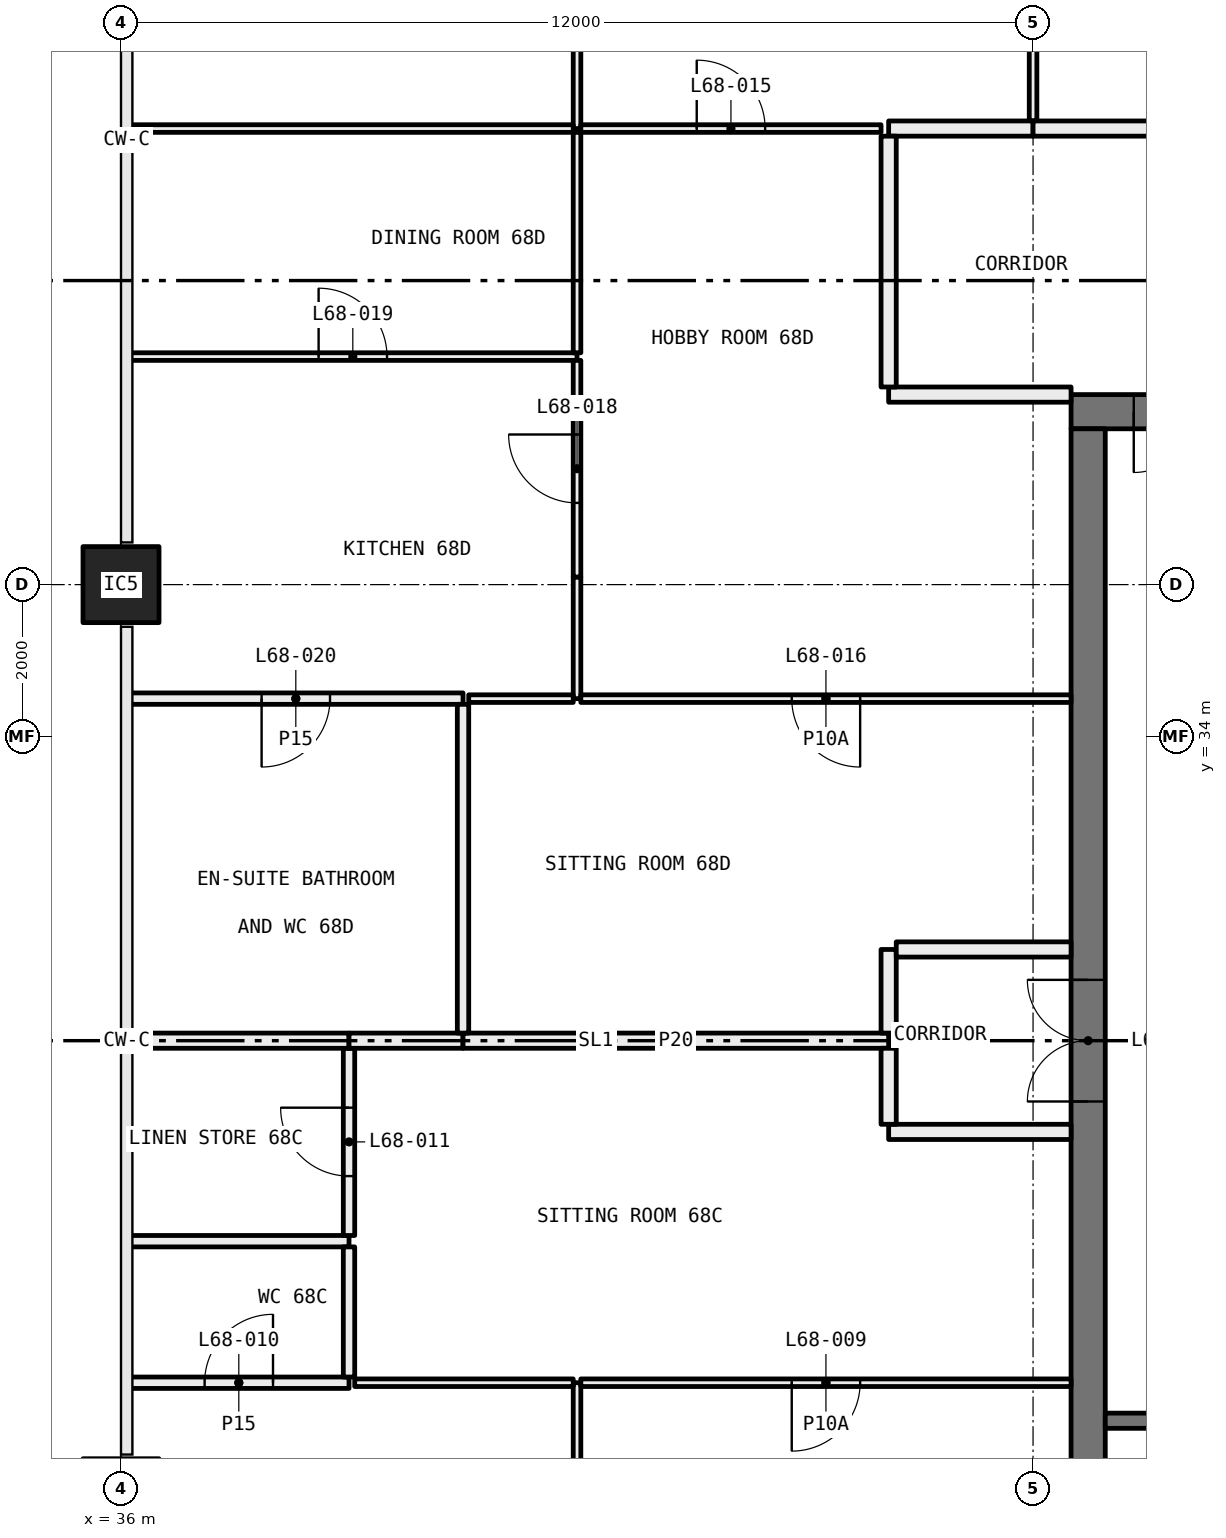
"""IFC4 building model, lengths in metres.
Left out: names, types, materials, properties, quantities, classifications, styles, units other than length and angle.
Written with IfcOpenShell. Run it as: python <this file> out.ifc"""

import sys

from ifc_helpers import new_model, si_unit, direction, frame, frame_2d, origin, origin_2d, place, context, subcontext, project, spatial, rectangle, hollow_rectangle, extrude, element, fill, save


model = new_model("IFC4")
c1 = context("Model", 3, precision=1e-05, world=origin(), true_north=direction((0.0, 1.0)))
c2 = subcontext(c1, "Body", "Model", "MODEL_VIEW")
j1 = project(units=[si_unit("LENGTHUNIT", "METRE"), si_unit("PLANEANGLEUNIT", "RADIAN")], contexts=[c1])
p1 = place(None, origin())
s1 = spatial("IfcSite", under=j1, at=p1, CompositionType="ELEMENT")
p2 = place(p1, origin())
s2 = spatial("IfcBuilding", under=s1, at=p2, CompositionType="ELEMENT")
p3 = place(p2, frame((0.0, 0.0, 252.45)))
s3 = spatial("IfcBuildingStorey", under=s2, at=p3, CompositionType="ELEMENT", Elevation=252.45)
p4 = place(p3, frame((36.0, 36.0, 0.0), z_axis=(0.0, 0.0, 1.0), x_axis=(1.0, 0.0, 0.0)))
e1 = element("IfcColumn", 1, at=p4, inside=s3, PredefinedType="COLUMN", context=c2, shape_type="SweptSolid", body=[
    extrude(hollow_rectangle(XDim=1.0, YDim=1.0, WallThickness=0.04, at=origin_2d()), origin(), (0.0, 0.0, 1.0), 3.05),
])
p5 = place(p3, frame((42.0, 24.1, 0.0), z_axis=(0.0, 0.0, 1.0), x_axis=(0.0, 1.0, 0.0)))
e2 = element("IfcWall", 2, at=p5, inside=s3, PredefinedType="PARTITIONING", context=c2, shape_type="SweptSolid", body=[
    extrude(rectangle(XDim=1.4, YDim=0.1, at=frame_2d((0.7, 0.0))), origin(), (0.0, 0.0, 1.0), 3.05),
])
p6 = place(p3, frame((39.0, 25.5, 0.0), z_axis=(0.0, 0.0, 1.0), x_axis=(-1.0, 0.0, 0.0)))
e3 = element("IfcWall", 3, at=p6, inside=s3, PredefinedType="PARTITIONING", context=c2, shape_type="SweptSolid", body=[
    extrude(rectangle(XDim=2.9, YDim=0.15, at=frame_2d((1.45, 0.0))), origin(), (0.0, 0.0, 1.0), 3.05),
])
p7 = place(p6, frame((1.0, 0.0, 0.0)))
e4 = element("IfcOpeningElement", 4, at=p7, cuts=e3, PredefinedType="OPENING", context=c2, shape_type="SweptSolid", body=[
    extrude(rectangle(XDim=0.9, YDim=2.1, at=frame_2d((0.45, 1.05))), frame((0.0, 0.085, 0.0), z_axis=(0.0, -1.0, 0.0), x_axis=(1.0, 0.0, 0.0)), (0.0, 0.0, 1.0), 0.17),
])
p8 = place(p3, frame((41.95, 25.5, 0.0), z_axis=(0.0, 0.0, 1.0), x_axis=(-1.0, 0.0, 0.0)))
e5 = element("IfcWall", 5, at=p8, inside=s3, PredefinedType="PARTITIONING", context=c2, shape_type="SweptSolid", body=[
    extrude(rectangle(XDim=2.875, YDim=0.1, at=frame_2d((1.438, 0.0))), origin(), (0.0, 0.0, 1.0), 3.05),
])
p9 = place(p3, frame((48.5, 25.5, 0.0), z_axis=(0.0, 0.0, 1.0), x_axis=(-1.0, 0.0, 0.0)))
e6 = element("IfcWall", 6, at=p9, inside=s3, PredefinedType="PARTITIONING", context=c2, shape_type="SweptSolid", body=[
    extrude(rectangle(XDim=6.45, YDim=0.1, at=frame_2d((3.225, 0.0))), origin(), (0.0, 0.0, 1.0), 3.05),
])
p10 = place(p9, frame((2.775, 0.0, 0.0)))
e7 = element("IfcOpeningElement", 7, at=p10, cuts=e6, PredefinedType="OPENING", context=c2, shape_type="SweptSolid", body=[
    extrude(rectangle(XDim=0.9, YDim=2.1, at=frame_2d((0.45, 1.05))), frame((0.0, 0.06, 0.0), z_axis=(0.0, -1.0, 0.0), x_axis=(1.0, 0.0, 0.0)), (0.0, 0.0, 1.0), 0.12),
])
p11 = place(p3, frame((39.0, 27.362, 0.0), z_axis=(0.0, 0.0, 1.0), x_axis=(-1.0, 0.0, 0.0)))
e8 = element("IfcWall", 8, at=p11, inside=s3, PredefinedType="PARTITIONING", context=c2, shape_type="SweptSolid", body=[
    extrude(rectangle(XDim=2.9, YDim=0.15, at=frame_2d((1.45, 0.0))), origin(), (0.0, 0.0, 1.0), 3.05),
])
p12 = place(p3, frame((39.0, 25.575, 0.0), z_axis=(0.0, 0.0, 1.0), x_axis=(0.0, 1.0, 0.0)))
e9 = element("IfcWall", 9, at=p12, inside=s3, PredefinedType="PARTITIONING", context=c2, shape_type="SweptSolid", body=[
    extrude(rectangle(XDim=1.712, YDim=0.15, at=frame_2d((0.856, 0.0))), origin(), (0.0, 0.0, 1.0), 3.05),
])
p13 = place(p3, frame((39.0, 27.437, 0.0), z_axis=(0.0, 0.0, 1.0), x_axis=(0.0, 1.0, 0.0)))
e10 = element("IfcWall", 10, at=p13, inside=s3, PredefinedType="PARTITIONING", context=c2, shape_type="SweptSolid", body=[
    extrude(rectangle(XDim=2.463, YDim=0.15, at=frame_2d((1.231, 0.0))), origin(), (0.0, 0.0, 1.0), 3.05),
])
p14 = place(p13, frame((0.781, 0.0, 0.0)))
e11 = element("IfcOpeningElement", 11, at=p14, cuts=e10, PredefinedType="OPENING", context=c2, shape_type="SweptSolid", body=[
    extrude(rectangle(XDim=0.9, YDim=2.1, at=frame_2d((0.45, 1.05))), frame((0.0, 0.085, 0.0), z_axis=(0.0, -1.0, 0.0), x_axis=(1.0, 0.0, 0.0)), (0.0, 0.0, 1.0), 0.17),
])
p15 = place(p3, frame((39.0, 30.0, 0.0), z_axis=(0.0, 0.0, 1.0), x_axis=(-1.0, 0.0, 0.0)))
e12 = element("IfcWall", 12, at=p15, inside=s3, PredefinedType="PARTITIONING", context=c2, shape_type="SweptSolid", body=[
    extrude(rectangle(XDim=2.9, YDim=0.2, at=frame_2d((1.45, 0.0))), origin(), (0.0, 0.0, 1.0), 3.05),
])
p16 = place(p3, frame((40.5, 30.0, 0.0), z_axis=(0.0, 0.0, 1.0), x_axis=(-1.0, 0.0, 0.0)))
e13 = element("IfcWall", 13, at=p16, inside=s3, PredefinedType="PARTITIONING", context=c2, shape_type="SweptSolid", body=[
    extrude(rectangle(XDim=1.5, YDim=0.2, at=frame_2d((0.75, 0.0))), origin(), (0.0, 0.0, 1.0), 3.05),
])
p17 = place(p3, frame((46.1, 30.0, 0.0), z_axis=(0.0, 0.0, 1.0), x_axis=(-1.0, 0.0, 0.0)))
e14 = element("IfcWall", 14, at=p17, inside=s3, PredefinedType="PARTITIONING", context=c2, shape_type="SweptSolid", body=[
    extrude(rectangle(XDim=5.6, YDim=0.2, at=frame_2d((2.8, 0.0))), origin(), (0.0, 0.0, 1.0), 3.05),
])
p18 = place(p3, frame((48.5, 28.8, 0.0), z_axis=(0.0, 0.0, 1.0), x_axis=(-1.0, 0.0, 0.0)))
e15 = element("IfcWall", 15, at=p18, inside=s3, PredefinedType="PARTITIONING", context=c2, shape_type="SweptSolid", body=[
    extrude(rectangle(XDim=2.4, YDim=0.2, at=frame_2d((1.2, 0.0))), origin(), (0.0, 0.0, 1.0), 3.05),
])
p19 = place(p3, frame((46.1, 28.9, 0.0), z_axis=(0.0, 0.0, 1.0), x_axis=(0.0, 1.0, 0.0)))
e16 = element("IfcWall", 16, at=p19, inside=s3, PredefinedType="PARTITIONING", context=c2, shape_type="SweptSolid", body=[
    extrude(rectangle(XDim=1.0, YDim=0.2, at=frame_2d((0.5, 0.0))), origin(), (0.0, 0.0, 1.0), 3.05),
])
p20 = place(p3, frame((42.0, 42.0, 0.0), z_axis=(0.0, 0.0, 1.0), x_axis=(0.0, 1.0, 0.0)))
e17 = element("IfcWall", 17, at=p20, inside=s3, PredefinedType="PARTITIONING", context=c2, shape_type="SweptSolid", body=[
    extrude(rectangle(XDim=5.28, YDim=0.1, at=frame_2d((2.64, 0.0))), origin(), (0.0, 0.0, 1.0), 3.05),
])
p21 = place(p20, frame((2.19, 0.0, 0.0)))
e18 = element("IfcOpeningElement", 18, at=p21, cuts=e17, PredefinedType="OPENING", context=c2, shape_type="SweptSolid", body=[
    extrude(rectangle(XDim=0.9, YDim=2.1, at=frame_2d((0.45, 1.05))), frame((0.0, 0.06, 0.0), z_axis=(0.0, -1.0, 0.0), x_axis=(1.0, 0.0, 0.0)), (0.0, 0.0, 1.0), 0.12),
])
p22 = place(p3, frame((36.1, 42.0, 0.0), z_axis=(0.0, 0.0, 1.0), x_axis=(1.0, 0.0, 0.0)))
e19 = element("IfcWall", 19, at=p22, inside=s3, PredefinedType="PARTITIONING", context=c2, shape_type="SweptSolid", body=[
    extrude(rectangle(XDim=5.85, YDim=0.1, at=frame_2d((2.925, 0.0))), origin(), (0.0, 0.0, 1.0), 3.05),
])
p23 = place(p3, frame((48.0, 42.1, 0.0), z_axis=(0.0, 0.0, 1.0), x_axis=(0.0, 1.0, 0.0)))
e20 = element("IfcWall", 20, at=p23, inside=s3, PredefinedType="PARTITIONING", context=c2, shape_type="SweptSolid", body=[
    extrude(rectangle(XDim=5.18, YDim=0.1, at=frame_2d((2.59, 0.0))), origin(), (0.0, 0.0, 1.0), 3.05),
])
p24 = place(p23, frame((2.14, 0.0, 0.0)))
e21 = element("IfcOpeningElement", 21, at=p24, cuts=e20, PredefinedType="OPENING", context=c2, shape_type="SweptSolid", body=[
    extrude(rectangle(XDim=0.9, YDim=2.1, at=frame_2d((0.45, 1.05))), frame((0.0, 0.06, 0.0), z_axis=(0.0, -1.0, 0.0), x_axis=(1.0, 0.0, 0.0)), (0.0, 0.0, 1.0), 0.12),
])
p25 = place(p3, frame((42.05, 42.0, 0.0), z_axis=(0.0, 0.0, 1.0), x_axis=(1.0, 0.0, 0.0)))
e22 = element("IfcWall", 22, at=p25, inside=s3, PredefinedType="PARTITIONING", context=c2, shape_type="SweptSolid", body=[
    extrude(rectangle(XDim=3.95, YDim=0.1, at=frame_2d((1.975, 0.0))), origin(), (0.0, 0.0, 1.0), 3.05),
])
p26 = place(p25, frame((1.525, 0.0, 0.0)))
e23 = element("IfcOpeningElement", 23, at=p26, cuts=e22, PredefinedType="OPENING", context=c2, shape_type="SweptSolid", body=[
    extrude(rectangle(XDim=0.9, YDim=2.1, at=frame_2d((0.45, 1.05))), frame((0.0, 0.06, 0.0), z_axis=(0.0, -1.0, 0.0), x_axis=(1.0, 0.0, 0.0)), (0.0, 0.0, 1.0), 0.12),
])
p27 = place(p3, frame((46.1, 42.0, 0.0), z_axis=(0.0, 0.0, 1.0), x_axis=(1.0, 0.0, 0.0)))
e24 = element("IfcWall", 24, at=p27, inside=s3, PredefinedType="PARTITIONING", context=c2, shape_type="SweptSolid", body=[
    extrude(rectangle(XDim=1.9, YDim=0.2, at=frame_2d((0.95, 0.0))), origin(), (0.0, 0.0, 1.0), 3.05),
])
p28 = place(p3, frame((48.0, 42.0, 0.0), z_axis=(0.0, 0.0, 1.0), x_axis=(1.0, 0.0, 0.0)))
e25 = element("IfcWall", 25, at=p28, inside=s3, PredefinedType="PARTITIONING", context=c2, shape_type="SweptSolid", body=[
    extrude(rectangle(XDim=3.5, YDim=0.2, at=frame_2d((1.75, 0.0))), origin(), (0.0, 0.0, 1.0), 3.05),
])
p29 = place(p3, frame((42.0, 39.0, 0.0), z_axis=(0.0, 0.0, 1.0), x_axis=(-1.0, 0.0, 0.0)))
e26 = element("IfcWall", 26, at=p29, inside=s3, PredefinedType="PARTITIONING", context=c2, shape_type="SweptSolid", body=[
    extrude(rectangle(XDim=5.9, YDim=0.1, at=frame_2d((2.95, 0.0))), origin(), (0.0, 0.0, 1.0), 3.05),
])
p30 = place(p29, frame((2.5, 0.0, 0.0)))
e27 = element("IfcOpeningElement", 27, at=p30, cuts=e26, PredefinedType="OPENING", context=c2, shape_type="SweptSolid", body=[
    extrude(rectangle(XDim=0.9, YDim=2.1, at=frame_2d((0.45, 1.05))), frame((0.0, 0.06, 0.0), z_axis=(0.0, -1.0, 0.0), x_axis=(1.0, 0.0, 0.0)), (0.0, 0.0, 1.0), 0.12),
])
p31 = place(p3, frame((42.0, 34.5, 0.0), z_axis=(0.0, 0.0, 1.0), x_axis=(0.0, 1.0, 0.0)))
e28 = element("IfcWall", 28, at=p31, inside=s3, PredefinedType="PARTITIONING", context=c2, shape_type="SweptSolid", body=[
    extrude(rectangle(XDim=1.6, YDim=0.1, at=frame_2d((0.8, 0.0))), origin(), (0.0, 0.0, 1.0), 2.45),
])
p32 = place(p3, frame((42.0, 36.1, 0.0), z_axis=(0.0, 0.0, 1.0), x_axis=(0.0, 1.0, 0.0)))
e29 = element("IfcWall", 29, at=p32, inside=s3, PredefinedType="PARTITIONING", context=c2, shape_type="SweptSolid", body=[
    extrude(rectangle(XDim=2.85, YDim=0.1, at=frame_2d((1.425, 0.0))), origin(), (0.0, 0.0, 1.0), 3.05),
])
p33 = place(p32, frame((0.975, 0.0, 0.0)))
e30 = element("IfcOpeningElement", 30, at=p33, cuts=e29, PredefinedType="OPENING", context=c2, shape_type="SweptSolid", body=[
    extrude(rectangle(XDim=0.9, YDim=2.1, at=frame_2d((0.45, 1.05))), frame((0.0, 0.06, 0.0), z_axis=(0.0, -1.0, 0.0), x_axis=(1.0, 0.0, 0.0)), (0.0, 0.0, 1.0), 0.12),
])
p34 = place(p3, frame((36.1, 34.5, 0.0), z_axis=(0.0, 0.0, 1.0), x_axis=(1.0, 0.0, 0.0)))
e31 = element("IfcWall", 31, at=p34, inside=s3, PredefinedType="PARTITIONING", context=c2, shape_type="SweptSolid", body=[
    extrude(rectangle(XDim=4.4, YDim=0.15, at=frame_2d((2.2, 0.0))), origin(), (0.0, 0.0, 1.0), 3.05),
])
p35 = place(p34, frame((1.75, 0.0, 0.0)))
e32 = element("IfcOpeningElement", 32, at=p35, cuts=e31, PredefinedType="OPENING", context=c2, shape_type="SweptSolid", body=[
    extrude(rectangle(XDim=0.9, YDim=2.1, at=frame_2d((0.45, 1.05))), frame((0.0, 0.085, 0.0), z_axis=(0.0, -1.0, 0.0), x_axis=(1.0, 0.0, 0.0)), (0.0, 0.0, 1.0), 0.17),
])
p36 = place(p3, frame((40.575, 34.5, 0.0), z_axis=(0.0, 0.0, 1.0), x_axis=(1.0, 0.0, 0.0)))
e33 = element("IfcWall", 33, at=p36, inside=s3, PredefinedType="PARTITIONING", context=c2, shape_type="SweptSolid", body=[
    extrude(rectangle(XDim=1.375, YDim=0.1, at=frame_2d((0.688, 0.0))), origin(), (0.0, 0.0, 1.0), 3.05),
])
p37 = place(p3, frame((42.0, 39.05, 0.0), z_axis=(0.0, 0.0, 1.0), x_axis=(0.0, 1.0, 0.0)))
e34 = element("IfcWall", 34, at=p37, inside=s3, PredefinedType="PARTITIONING", context=c2, shape_type="SweptSolid", body=[
    extrude(rectangle(XDim=2.9, YDim=0.1, at=frame_2d((1.45, 0.0))), origin(), (0.0, 0.0, 1.0), 3.05),
])
p38 = place(p3, frame((42.05, 34.5, 0.0), z_axis=(0.0, 0.0, 1.0), x_axis=(1.0, 0.0, 0.0)))
e35 = element("IfcWall", 35, at=p38, inside=s3, PredefinedType="PARTITIONING", context=c2, shape_type="SweptSolid", body=[
    extrude(rectangle(XDim=6.45, YDim=0.1, at=frame_2d((3.225, 0.0))), origin(), (0.0, 0.0, 1.0), 3.05),
])
p39 = place(p38, frame((2.775, 0.0, 0.0)))
e36 = element("IfcOpeningElement", 36, at=p39, cuts=e35, PredefinedType="OPENING", context=c2, shape_type="SweptSolid", body=[
    extrude(rectangle(XDim=0.9, YDim=2.1, at=frame_2d((0.45, 1.05))), frame((0.0, 0.06, 0.0), z_axis=(0.0, -1.0, 0.0), x_axis=(1.0, 0.0, 0.0)), (0.0, 0.0, 1.0), 0.12),
])
p40 = place(p3, frame((48.5, 38.5, 0.0), z_axis=(0.0, 0.0, 1.0), x_axis=(-1.0, 0.0, 0.0)))
e37 = element("IfcWall", 37, at=p40, inside=s3, PredefinedType="PARTITIONING", context=c2, shape_type="SweptSolid", body=[
    extrude(rectangle(XDim=2.4, YDim=0.2, at=frame_2d((1.2, 0.0))), origin(), (0.0, 0.0, 1.0), 3.05),
])
p41 = place(p3, frame((46.1, 38.6, 0.0), z_axis=(0.0, 0.0, 1.0), x_axis=(0.0, 1.0, 0.0)))
e38 = element("IfcWall", 38, at=p41, inside=s3, PredefinedType="PARTITIONING", context=c2, shape_type="SweptSolid", body=[
    extrude(rectangle(XDim=3.3, YDim=0.2, at=frame_2d((1.65, 0.0))), origin(), (0.0, 0.0, 1.0), 3.05),
])
p42 = place(p3, frame((40.5, 30.1, 0.0), z_axis=(0.0, 0.0, 1.0), x_axis=(0.0, 1.0, 0.0)))
e39 = element("IfcWall", 39, at=p42, inside=s3, PredefinedType="PARTITIONING", context=c2, shape_type="SweptSolid", body=[
    extrude(rectangle(XDim=4.325, YDim=0.15, at=frame_2d((2.163, 0.0))), origin(), (0.0, 0.0, 1.0), 3.05),
])
p43 = place(p3, frame((46.1, 30.1, 0.0), z_axis=(0.0, 0.0, 1.0), x_axis=(0.0, 1.0, 0.0)))
e40 = element("IfcWall", 40, at=p43, inside=s3, PredefinedType="PARTITIONING", context=c2, shape_type="SweptSolid", body=[
    extrude(rectangle(XDim=1.1, YDim=0.2, at=frame_2d((0.55, 0.0))), origin(), (0.0, 0.0, 1.0), 3.05),
])
p44 = place(p3, frame((46.2, 31.2, 0.0), z_axis=(0.0, 0.0, 1.0), x_axis=(1.0, 0.0, 0.0)))
e41 = element("IfcWall", 41, at=p44, inside=s3, PredefinedType="PARTITIONING", context=c2, shape_type="SweptSolid", body=[
    extrude(rectangle(XDim=2.3, YDim=0.2, at=frame_2d((1.15, 0.0))), origin(), (0.0, 0.0, 1.0), 3.05),
])
p45 = place(p3, frame((59.5, 38.275, 0.0), z_axis=(0.0, 0.0, 1.0), x_axis=(-1.0, 0.0, 0.0)))
e42 = element("IfcWall", 42, at=p45, inside=s3, PredefinedType="SHEAR", context=c2, shape_type="SweptSolid", body=[
    extrude(rectangle(XDim=11.0, YDim=0.45, at=frame_2d((5.5, 0.0))), origin(), (0.0, 0.0, 1.0), 3.05),
])
p46 = place(p45, frame((8.575, 0.0, 0.0)))
e43 = element("IfcOpeningElement", 43, at=p46, cuts=e42, PredefinedType="OPENING", context=c2, shape_type="SweptSolid", body=[
    extrude(rectangle(XDim=1.6, YDim=2.1, at=frame_2d((0.8, 1.05))), frame((0.0, 0.235, 0.0), z_axis=(0.0, -1.0, 0.0), x_axis=(1.0, 0.0, 0.0)), (0.0, 0.0, 1.0), 0.47),
])
p47 = place(p3, frame((48.725, 21.95, 0.0), z_axis=(0.0, 0.0, 1.0), x_axis=(0.0, 1.0, 0.0)))
e44 = element("IfcWall", 44, at=p47, inside=s3, PredefinedType="SHEAR", context=c2, shape_type="SweptSolid", body=[
    extrude(rectangle(XDim=16.1, YDim=0.45, at=frame_2d((8.05, 0.0))), origin(), (0.0, 0.0, 1.0), 3.05),
])
p48 = place(p47, frame((7.25, 0.0, 0.0)))
e45 = element("IfcOpeningElement", 45, at=p48, cuts=e44, PredefinedType="OPENING", context=c2, shape_type="SweptSolid", body=[
    extrude(rectangle(XDim=1.6, YDim=2.1, at=frame_2d((0.8, 1.05))), frame((0.0, 0.235, 0.0), z_axis=(0.0, -1.0, 0.0), x_axis=(1.0, 0.0, 0.0)), (0.0, 0.0, 1.0), 0.47),
])
p49 = place(p3, frame((56.5, 25.0, 0.0), z_axis=(0.0, 0.0, 1.0), x_axis=(-1.0, 0.0, 0.0)))
e46 = element("IfcWall", 46, at=p49, inside=s3, PredefinedType="SOLIDWALL", context=c2, shape_type="SweptSolid", body=[
    extrude(rectangle(XDim=7.55, YDim=0.2, at=frame_2d((3.775, 0.0))), origin(), (0.0, 0.0, 1.0), 3.05),
])
p50 = place(p10, origin())
e47 = element("IfcDoor", 47, at=p50, inside=s3, OperationType="SINGLE_SWING_LEFT", PredefinedType="DOOR", context=c2, shape_type="SweptSolid", body=[
    extrude(rectangle(XDim=0.9, YDim=2.1, at=frame_2d((0.45, 1.05))), frame((0.0, 0.025, 0.0), z_axis=(0.0, -1.0, 0.0), x_axis=(1.0, 0.0, 0.0)), (0.0, 0.0, 1.0), 0.05),
])
fill(e7, e47)
p51 = place(p7, frame((0.9, 0.0, 0.0), x_axis=(-1.0, 0.0, 0.0)))
e48 = element("IfcDoor", 48, at=p51, inside=s3, OperationType="SINGLE_SWING_LEFT", PredefinedType="DOOR", context=c2, shape_type="SweptSolid", body=[
    extrude(rectangle(XDim=0.9, YDim=2.1, at=frame_2d((0.45, 1.05))), frame((0.0, 0.025, 0.0), z_axis=(0.0, -1.0, 0.0), x_axis=(1.0, 0.0, 0.0)), (0.0, 0.0, 1.0), 0.05),
])
fill(e4, e48)
p52 = place(p14, origin())
e49 = element("IfcDoor", 49, at=p52, inside=s3, OperationType="SINGLE_SWING_LEFT", PredefinedType="DOOR", context=c2, shape_type="SweptSolid", body=[
    extrude(rectangle(XDim=0.9, YDim=2.1, at=frame_2d((0.45, 1.05))), frame((0.0, 0.025, 0.0), z_axis=(0.0, -1.0, 0.0), x_axis=(1.0, 0.0, 0.0)), (0.0, 0.0, 1.0), 0.05),
])
fill(e11, e49)
p53 = place(p26, origin())
e50 = element("IfcDoor", 50, at=p53, inside=s3, OperationType="SINGLE_SWING_RIGHT", PredefinedType="DOOR", context=c2, shape_type="SweptSolid", body=[
    extrude(rectangle(XDim=0.9, YDim=2.1, at=frame_2d((0.45, 1.05))), frame((0.0, 0.025, 0.0), z_axis=(0.0, -1.0, 0.0), x_axis=(1.0, 0.0, 0.0)), (0.0, 0.0, 1.0), 0.05),
])
fill(e23, e50)
p54 = place(p39, frame((0.9, 0.0, 0.0), x_axis=(-1.0, 0.0, 0.0)))
e51 = element("IfcDoor", 51, at=p54, inside=s3, OperationType="SINGLE_SWING_RIGHT", PredefinedType="DOOR", context=c2, shape_type="SweptSolid", body=[
    extrude(rectangle(XDim=0.9, YDim=2.1, at=frame_2d((0.45, 1.05))), frame((0.0, 0.025, 0.0), z_axis=(0.0, -1.0, 0.0), x_axis=(1.0, 0.0, 0.0)), (0.0, 0.0, 1.0), 0.05),
])
fill(e36, e51)
p55 = place(p33, origin())
e52 = element("IfcDoor", 52, at=p55, inside=s3, OperationType="SINGLE_SWING_LEFT", PredefinedType="DOOR", context=c2, shape_type="SweptSolid", body=[
    extrude(rectangle(XDim=0.9, YDim=2.1, at=frame_2d((0.45, 1.05))), frame((0.0, 0.025, 0.0), z_axis=(0.0, -1.0, 0.0), x_axis=(1.0, 0.0, 0.0)), (0.0, 0.0, 1.0), 0.05),
])
fill(e30, e52)
p56 = place(p30, frame((0.9, 0.0, 0.0), x_axis=(-1.0, 0.0, 0.0)))
e53 = element("IfcDoor", 53, at=p56, inside=s3, OperationType="SINGLE_SWING_RIGHT", PredefinedType="DOOR", context=c2, shape_type="SweptSolid", body=[
    extrude(rectangle(XDim=0.9, YDim=2.1, at=frame_2d((0.45, 1.05))), frame((0.0, 0.025, 0.0), z_axis=(0.0, -1.0, 0.0), x_axis=(1.0, 0.0, 0.0)), (0.0, 0.0, 1.0), 0.05),
])
fill(e27, e53)
p57 = place(p35, frame((0.9, 0.0, 0.0), x_axis=(-1.0, 0.0, 0.0)))
e54 = element("IfcDoor", 54, at=p57, inside=s3, OperationType="SINGLE_SWING_LEFT", PredefinedType="DOOR", context=c2, shape_type="SweptSolid", body=[
    extrude(rectangle(XDim=0.9, YDim=2.1, at=frame_2d((0.45, 1.05))), frame((0.0, 0.025, 0.0), z_axis=(0.0, -1.0, 0.0), x_axis=(1.0, 0.0, 0.0)), (0.0, 0.0, 1.0), 0.05),
])
fill(e32, e54)
p58 = place(p46, origin())
e55 = element("IfcDoor", 55, at=p58, inside=s3, OperationType="DOUBLE_DOOR_SINGLE_SWING", PredefinedType="DOOR", context=c2, shape_type="SweptSolid", body=[
    extrude(rectangle(XDim=1.6, YDim=2.1, at=frame_2d((0.8, 1.05))), frame((0.0, 0.025, 0.0), z_axis=(0.0, -1.0, 0.0), x_axis=(1.0, 0.0, 0.0)), (0.0, 0.0, 1.0), 0.05),
])
fill(e43, e55)
p59 = place(p48, origin())
e56 = element("IfcDoor", 56, at=p59, inside=s3, OperationType="DOUBLE_DOOR_SINGLE_SWING", PredefinedType="DOOR", context=c2, shape_type="SweptSolid", body=[
    extrude(rectangle(XDim=1.6, YDim=2.1, at=frame_2d((0.8, 1.05))), frame((0.0, 0.025, 0.0), z_axis=(0.0, -1.0, 0.0), x_axis=(1.0, 0.0, 0.0)), (0.0, 0.0, 1.0), 0.05),
])
fill(e45, e56)
save(model, sys.argv[1])
